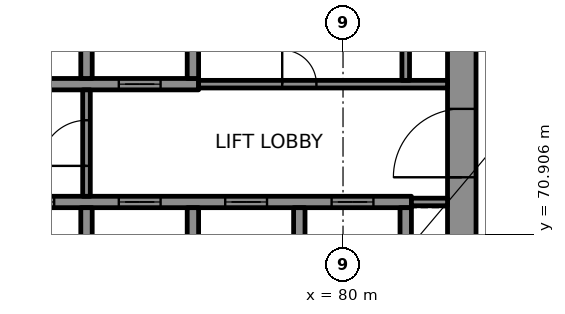
"""IFC4 building model, lengths in metres.
Left out: names, types, materials, properties, quantities, classifications, styles, units other than length and angle.
Written with IfcOpenShell. Run it as: python <this file> out.ifc"""

import sys

from ifc_helpers import new_model, si_unit, direction, frame, frame_2d, origin, place, context, subcontext, project, spatial, rectangle, extrude, element, fill, save


model = new_model("IFC4")
c1 = context("Model", 3, precision=1e-05, world=origin(), true_north=direction((0.0, 1.0)))
c2 = subcontext(c1, "Body", "Model", "MODEL_VIEW")
j1 = project(units=[si_unit("LENGTHUNIT", "METRE"), si_unit("PLANEANGLEUNIT", "RADIAN")], contexts=[c1])
p1 = place(None, origin())
s1 = spatial("IfcSite", under=j1, at=p1, CompositionType="ELEMENT")
p2 = place(p1, origin())
s2 = spatial("IfcBuilding", under=s1, at=p2, CompositionType="ELEMENT")
p3 = place(p2, frame((0.0, 0.0, 277.6)))
s3 = spatial("IfcBuildingStorey", under=s2, at=p3, CompositionType="ELEMENT", Elevation=277.6)
p4 = place(p3, frame((83.125, 69.0, 0.0), z_axis=(0.0, 0.0, 1.0), x_axis=(0.0, 1.0, 0.0)))
e1 = element("IfcWall", 1, at=p4, inside=s3, PredefinedType="SHEAR", context=c2, shape_type="SweptSolid", body=[
    extrude(rectangle(XDim=12.0, YDim=0.75, at=frame_2d((6.0, 0.0))), origin(), (0.0, 0.0, 1.0), 3.3),
])
p5 = place(p4, frame((3.4, 0.0, 0.0)))
e2 = element("IfcOpeningElement", 2, at=p5, cuts=e1, PredefinedType="OPENING", context=c2, shape_type="SweptSolid", body=[
    extrude(rectangle(XDim=1.8, YDim=2.1, at=frame_2d((0.9, 1.05))), frame((0.0, 0.385, 0.0), z_axis=(0.0, -1.0, 0.0), x_axis=(1.0, 0.0, 0.0)), (0.0, 0.0, 1.0), 0.77),
])
p6 = place(p3, frame((70.3, 71.75, 0.0), z_axis=(0.0, 0.0, 1.0), x_axis=(1.0, 0.0, 0.0)))
e3 = element("IfcWall", 3, at=p6, inside=s3, PredefinedType="SHEAR", context=c2, shape_type="SweptSolid", body=[
    extrude(rectangle(XDim=11.5, YDim=0.3, at=frame_2d((5.75, 0.0))), origin(), (0.0, 0.0, 1.0), 3.3),
])
p7 = place(p6, frame((1.0, 0.0, 0.0)))
e4 = element("IfcOpeningElement", 4, at=p7, cuts=e3, PredefinedType="OPENING", context=c2, shape_type="SweptSolid", body=[
    extrude(rectangle(XDim=1.1, YDim=2.1, at=frame_2d((0.55, 1.05))), frame((0.0, 0.16, 0.0), z_axis=(0.0, -1.0, 0.0), x_axis=(1.0, 0.0, 0.0)), (0.0, 0.0, 1.0), 0.32),
])
p8 = place(p6, frame((3.8, 0.0, 0.0)))
e5 = element("IfcOpeningElement", 5, at=p8, cuts=e3, PredefinedType="OPENING", context=c2, shape_type="SweptSolid", body=[
    extrude(rectangle(XDim=1.1, YDim=2.1, at=frame_2d((0.55, 1.05))), frame((0.0, 0.16, 0.0), z_axis=(0.0, -1.0, 0.0), x_axis=(1.0, 0.0, 0.0)), (0.0, 0.0, 1.0), 0.32),
])
p9 = place(p6, frame((6.6, 0.0, 0.0)))
e6 = element("IfcOpeningElement", 6, at=p9, cuts=e3, PredefinedType="OPENING", context=c2, shape_type="SweptSolid", body=[
    extrude(rectangle(XDim=1.1, YDim=2.1, at=frame_2d((0.55, 1.05))), frame((0.0, 0.16, 0.0), z_axis=(0.0, -1.0, 0.0), x_axis=(1.0, 0.0, 0.0)), (0.0, 0.0, 1.0), 0.32),
])
p10 = place(p6, frame((9.4, 0.0, 0.0)))
e7 = element("IfcOpeningElement", 7, at=p10, cuts=e3, PredefinedType="OPENING", context=c2, shape_type="SweptSolid", body=[
    extrude(rectangle(XDim=1.1, YDim=2.1, at=frame_2d((0.55, 1.05))), frame((0.0, 0.16, 0.0), z_axis=(0.0, -1.0, 0.0), x_axis=(1.0, 0.0, 0.0)), (0.0, 0.0, 1.0), 0.32),
])
p11 = place(p3, frame((70.3, 74.85, 0.0), z_axis=(0.0, 0.0, 1.0), x_axis=(1.0, 0.0, 0.0)))
e8 = element("IfcWall", 8, at=p11, inside=s3, PredefinedType="SHEAR", context=c2, shape_type="SweptSolid", body=[
    extrude(rectangle(XDim=5.9, YDim=0.3, at=frame_2d((2.95, 0.0))), origin(), (0.0, 0.0, 1.0), 3.3),
])
p12 = place(p11, frame((3.8, 0.0, 0.0)))
e9 = element("IfcOpeningElement", 9, at=p12, cuts=e8, PredefinedType="OPENING", context=c2, shape_type="SweptSolid", body=[
    extrude(rectangle(XDim=1.1, YDim=2.1, at=frame_2d((0.55, 1.05))), frame((0.0, 0.16, 0.0), z_axis=(0.0, -1.0, 0.0), x_axis=(1.0, 0.0, 0.0)), (0.0, 0.0, 1.0), 0.32),
])
for number, where, z_axis, x_axis in (
    (10, (73.25, 69.0, 0.0), (0.0, 0.0, 1.0), (0.0, 1.0, 0.0)),
    (11, (73.25, 75.0, 0.0), (0.0, 0.0, 1.0), (0.0, 1.0, 0.0)),
    (12, (76.05, 69.0, 0.0), (0.0, 0.0, 1.0), (0.0, 1.0, 0.0)),
    (13, (76.05, 75.0, 0.0), (0.0, 0.0, 1.0), (0.0, 1.0, 0.0)),
    (14, (78.85, 69.0, 0.0), (0.0, 0.0, 1.0), (0.0, 1.0, 0.0)),
    (15, (81.65, 69.0, 0.0), (0.0, 0.0, 1.0), (0.0, 1.0, 0.0)),
):
    element("IfcWall", number, at=place(p3, frame(where, z_axis=z_axis, x_axis=x_axis)), inside=s3, PredefinedType="SHEAR", context=c2, shape_type="SweptSolid", body=[
        extrude(rectangle(XDim=2.6, YDim=0.3, at=frame_2d((1.3, 0.0))), origin(), (0.0, 0.0, 1.0), 3.3),
    ])
p13 = place(p3, frame((81.8, 71.75, 0.0), z_axis=(0.0, 0.0, 1.0), x_axis=(1.0, 0.0, 0.0)))
e16 = element("IfcWall", 16, at=p13, inside=s3, PredefinedType="PARTITIONING", context=c2, shape_type="SweptSolid", body=[
    extrude(rectangle(XDim=0.95, YDim=0.2, at=frame_2d((0.475, 0.0))), origin(), (0.0, 0.0, 1.0), 3.3),
])
p14 = place(p3, frame((76.2, 74.85, 0.0), z_axis=(0.0, 0.0, 1.0), x_axis=(1.0, 0.0, 0.0)))
e17 = element("IfcWall", 17, at=p14, inside=s3, PredefinedType="PARTITIONING", context=c2, shape_type="SweptSolid", body=[
    extrude(rectangle(XDim=6.55, YDim=0.2, at=frame_2d((3.275, 0.0))), origin(), (0.0, 0.0, 1.0), 3.3),
])
p15 = place(p14, frame((2.2, 0.0, 0.0)))
e18 = element("IfcOpeningElement", 18, at=p15, cuts=e17, PredefinedType="OPENING", context=c2, shape_type="SweptSolid", body=[
    extrude(rectangle(XDim=0.9, YDim=2.1, at=frame_2d((0.45, 1.05))), frame((0.0, 0.11, 0.0), z_axis=(0.0, -1.0, 0.0), x_axis=(1.0, 0.0, 0.0)), (0.0, 0.0, 1.0), 0.22),
])
p16 = place(p3, frame((73.25, 71.9, 0.0), z_axis=(0.0, 0.0, 1.0), x_axis=(0.0, 1.0, 0.0)))
e19 = element("IfcWall", 19, at=p16, inside=s3, PredefinedType="PARTITIONING", context=c2, shape_type="SweptSolid", body=[
    extrude(rectangle(XDim=2.8, YDim=0.2, at=frame_2d((1.4, 0.0))), origin(), (0.0, 0.0, 1.0), 3.3),
])
p17 = place(p16, frame((0.8, 0.0, 0.0)))
e20 = element("IfcOpeningElement", 20, at=p17, cuts=e19, PredefinedType="OPENING", context=c2, shape_type="SweptSolid", body=[
    extrude(rectangle(XDim=1.2, YDim=2.1, at=frame_2d((0.6, 1.05))), frame((0.0, 0.11, 0.0), z_axis=(0.0, -1.0, 0.0), x_axis=(1.0, 0.0, 0.0)), (0.0, 0.0, 1.0), 0.22),
])
p18 = place(p3, frame((81.65, 74.95, 0.0), z_axis=(0.0, 0.0, 1.0), x_axis=(0.0, 1.0, 0.0)))
e21 = element("IfcWall", 21, at=p18, inside=s3, PredefinedType="PARTITIONING", context=c2, shape_type="SweptSolid", body=[
    extrude(rectangle(XDim=2.65, YDim=0.2, at=frame_2d((1.325, 0.0))), origin(), (0.0, 0.0, 1.0), 3.3),
])
p19 = place(p7, origin())
e22 = element("IfcDoor", 22, at=p19, inside=s3, OperationType="DOUBLE_DOOR_SLIDING", PredefinedType="DOOR", context=c2, shape_type="SweptSolid", body=[
    extrude(rectangle(XDim=1.1, YDim=2.1, at=frame_2d((0.55, 1.05))), frame((0.0, 0.025, 0.0), z_axis=(0.0, -1.0, 0.0), x_axis=(1.0, 0.0, 0.0)), (0.0, 0.0, 1.0), 0.05),
])
fill(e4, e22)
p20 = place(p8, origin())
e23 = element("IfcDoor", 23, at=p20, inside=s3, OperationType="DOUBLE_DOOR_SLIDING", PredefinedType="DOOR", context=c2, shape_type="SweptSolid", body=[
    extrude(rectangle(XDim=1.1, YDim=2.1, at=frame_2d((0.55, 1.05))), frame((0.0, 0.025, 0.0), z_axis=(0.0, -1.0, 0.0), x_axis=(1.0, 0.0, 0.0)), (0.0, 0.0, 1.0), 0.05),
])
fill(e5, e23)
p21 = place(p9, origin())
e24 = element("IfcDoor", 24, at=p21, inside=s3, OperationType="DOUBLE_DOOR_SLIDING", PredefinedType="DOOR", context=c2, shape_type="SweptSolid", body=[
    extrude(rectangle(XDim=1.1, YDim=2.1, at=frame_2d((0.55, 1.05))), frame((0.0, 0.025, 0.0), z_axis=(0.0, -1.0, 0.0), x_axis=(1.0, 0.0, 0.0)), (0.0, 0.0, 1.0), 0.05),
])
fill(e6, e24)
p22 = place(p10, origin())
e25 = element("IfcDoor", 25, at=p22, inside=s3, OperationType="DOUBLE_DOOR_SLIDING", PredefinedType="DOOR", context=c2, shape_type="SweptSolid", body=[
    extrude(rectangle(XDim=1.1, YDim=2.1, at=frame_2d((0.55, 1.05))), frame((0.0, 0.025, 0.0), z_axis=(0.0, -1.0, 0.0), x_axis=(1.0, 0.0, 0.0)), (0.0, 0.0, 1.0), 0.05),
])
fill(e7, e25)
p23 = place(p12, origin())
e26 = element("IfcDoor", 26, at=p23, inside=s3, OperationType="DOUBLE_DOOR_SLIDING", PredefinedType="DOOR", context=c2, shape_type="SweptSolid", body=[
    extrude(rectangle(XDim=1.1, YDim=2.1, at=frame_2d((0.55, 1.05))), frame((0.0, 0.025, 0.0), z_axis=(0.0, -1.0, 0.0), x_axis=(1.0, 0.0, 0.0)), (0.0, 0.0, 1.0), 0.05),
])
fill(e9, e26)
p24 = place(p17, origin())
e27 = element("IfcDoor", 27, at=p24, inside=s3, OperationType="SINGLE_SWING_LEFT", PredefinedType="DOOR", context=c2, shape_type="SweptSolid", body=[
    extrude(rectangle(XDim=1.2, YDim=2.1, at=frame_2d((0.6, 1.05))), frame((0.0, 0.025, 0.0), z_axis=(0.0, -1.0, 0.0), x_axis=(1.0, 0.0, 0.0)), (0.0, 0.0, 1.0), 0.05),
])
fill(e20, e27)
p25 = place(p5, origin())
e28 = element("IfcDoor", 28, at=p25, inside=s3, OperationType="SINGLE_SWING_LEFT", PredefinedType="DOOR", context=c2, shape_type="SweptSolid", body=[
    extrude(rectangle(XDim=1.8, YDim=2.1, at=frame_2d((0.9, 1.05))), frame((0.0, 0.095, 0.0), z_axis=(0.0, -1.0, 0.0), x_axis=(1.0, 0.0, 0.0)), (0.0, 0.0, 1.0), 0.19),
])
fill(e2, e28)
p26 = place(p15, origin())
e29 = element("IfcDoor", 29, at=p26, inside=s3, OperationType="SINGLE_SWING_LEFT", PredefinedType="DOOR", context=c2, shape_type="SweptSolid", body=[
    extrude(rectangle(XDim=0.9, YDim=2.1, at=frame_2d((0.45, 1.05))), frame((0.0, 0.025, 0.0), z_axis=(0.0, -1.0, 0.0), x_axis=(1.0, 0.0, 0.0)), (0.0, 0.0, 1.0), 0.05),
])
fill(e18, e29)
save(model, sys.argv[1])
